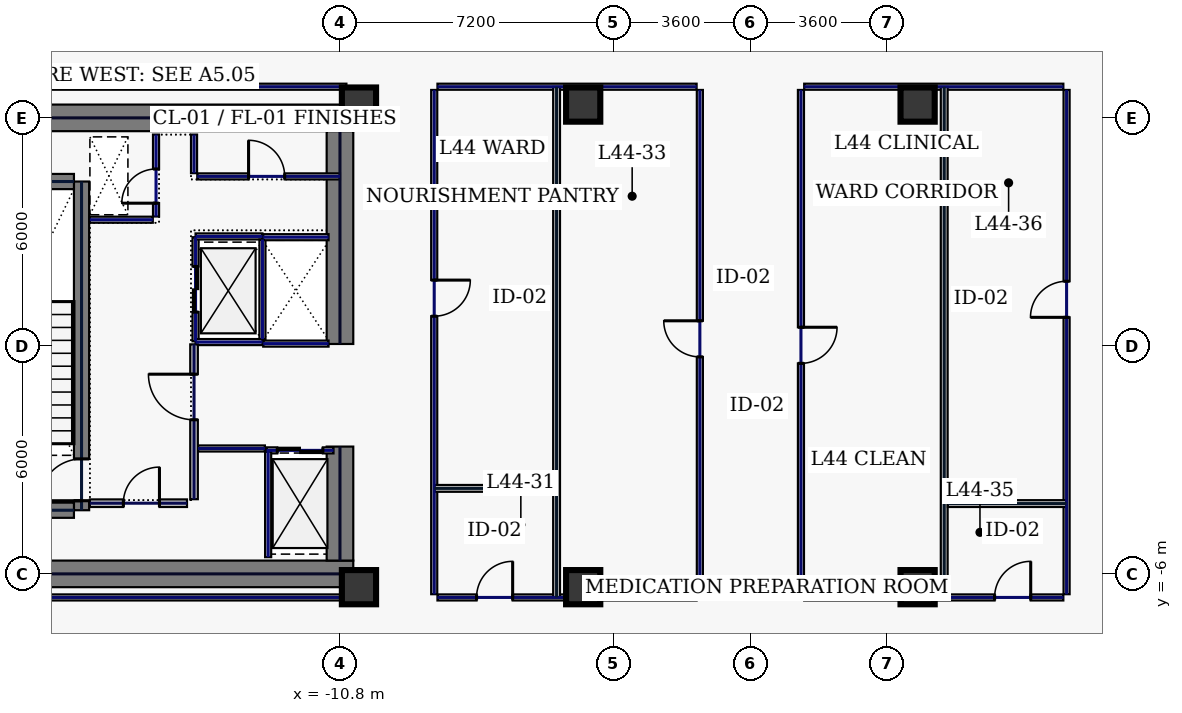
"""IFC4 building model, lengths in metres.
Left out: names, types, materials, properties, quantities, classifications, styles, units other than length and angle.
Written with IfcOpenShell. Run it as: python <this file> out.ifc"""

import sys

from ifc_helpers import new_model, si_unit, direction, frame, frame_2d, origin, origin_2d, place, context, subcontext, project, spatial, rectangle, hollow_rectangle, extrude, element, fill, save


model = new_model("IFC4")
c1 = context("Model", 3, precision=1e-05, world=origin(), true_north=direction((0.0, 1.0)))
c2 = subcontext(c1, "Body", "Model", "MODEL_VIEW")
j1 = project(units=[si_unit("LENGTHUNIT", "METRE"), si_unit("PLANEANGLEUNIT", "RADIAN")], contexts=[c1])
p1 = place(None, origin())
s1 = spatial("IfcSite", under=j1, at=p1, CompositionType="ELEMENT")
p2 = place(p1, origin())
s2 = spatial("IfcBuilding", under=s1, at=p2, CompositionType="ELEMENT")
p3 = place(p2, frame((0.0, 0.0, 192.2)))
s3 = spatial("IfcBuildingStorey", under=s2, at=p3, CompositionType="ELEMENT", Elevation=192.2)
for number, where, z_axis, x_axis in (
    (1, (-22.0, 6.0, 0.0), (0.0, 0.0, 1.0), (1.0, 0.0, 0.0)),
    (2, (-22.0, -6.0, 0.0), (0.0, 0.0, 1.0), (1.0, 0.0, 0.0)),
):
    element("IfcWall", number, at=place(p3, frame(where, z_axis=z_axis, x_axis=x_axis)), inside=s3, PredefinedType="SHEAR", context=c2, shape_type="SweptSolid", body=[
        extrude(rectangle(XDim=11.55, YDim=0.7, at=frame_2d((5.775, 0.0))), origin(), (0.0, 0.0, 1.0), 3.74),
    ])
p4 = place(p3, frame((-10.8, -5.65, 0.0), z_axis=(0.0, 0.0, 1.0), x_axis=(0.0, 1.0, 0.0)))
e3 = element("IfcWall", 3, at=p4, inside=s3, PredefinedType="SHEAR", context=c2, shape_type="SweptSolid", body=[
    extrude(rectangle(XDim=3.0, YDim=0.7, at=frame_2d((1.5, 0.0))), origin(), (0.0, 0.0, 1.0), 3.74),
])
p5 = place(p3, frame((-10.8, 0.05, 0.0), z_axis=(0.0, 0.0, 1.0), x_axis=(0.0, 1.0, 0.0)))
e4 = element("IfcWall", 4, at=p5, inside=s3, PredefinedType="SHEAR", context=c2, shape_type="SweptSolid", body=[
    extrude(rectangle(XDim=5.6, YDim=0.7, at=frame_2d((2.8, 0.0))), origin(), (0.0, 0.0, 1.0), 3.74),
])
p6 = place(p3, frame((-17.6, -4.325, 0.0), z_axis=(0.0, 0.0, 1.0), x_axis=(0.0, 1.0, 0.0)))
e5 = element("IfcWall", 5, at=p6, inside=s3, PredefinedType="SHEAR", context=c2, shape_type="SweptSolid", body=[
    extrude(rectangle(XDim=8.65, YDim=0.4, at=frame_2d((4.325, 0.0))), origin(), (0.0, 0.0, 1.0), 3.74),
])
p7 = place(p6, frame((0.25, 0.0, 0.0)))
e6 = element("IfcOpeningElement", 6, at=p7, cuts=e5, PredefinedType="OPENING", context=c2, shape_type="SweptSolid", body=[
    extrude(rectangle(XDim=1.1, YDim=2.2, at=frame_2d((0.55, 1.1))), frame((0.0, 0.21, 0.0), z_axis=(0.0, -1.0, 0.0), x_axis=(1.0, 0.0, 0.0)), (0.0, 0.0, 1.0), 0.42),
])
for number, where, z_axis, x_axis in (
    (7, (-21.2, -4.325, 0.0), (0.0, 0.0, 1.0), (1.0, 0.0, 0.0)),
    (8, (-21.2, 4.325, 0.0), (0.0, 0.0, 1.0), (1.0, 0.0, 0.0)),
):
    element("IfcWall", number, at=place(p3, frame(where, z_axis=z_axis, x_axis=x_axis)), inside=s3, PredefinedType="SHEAR", context=c2, shape_type="SweptSolid", body=[
        extrude(rectangle(XDim=3.4, YDim=0.4, at=frame_2d((1.7, 0.0))), origin(), (0.0, 0.0, 1.0), 3.74),
    ])
for number, where, z_axis, x_axis in (
    (9, (-10.3, -6.35, 0.0), (0.0, 0.0, 1.0), (1.0, 0.0, 0.0)),
    (10, (-10.3, 6.35, 0.0), (0.0, 0.0, 1.0), (1.0, 0.0, 0.0)),
    (11, (-4.4, -6.35, 0.0), (0.0, 0.0, 1.0), (1.0, 0.0, 0.0)),
    (12, (4.4, -6.35, 0.0), (0.0, 0.0, 1.0), (1.0, 0.0, 0.0)),
    (13, (-4.4, 6.35, 0.0), (0.0, 0.0, 1.0), (1.0, 0.0, 0.0)),
    (14, (4.4, 6.35, 0.0), (0.0, 0.0, 1.0), (1.0, 0.0, 0.0)),
):
    element("IfcColumn", number, at=place(p3, frame(where, z_axis=z_axis, x_axis=x_axis)), inside=s3, PredefinedType="COLUMN", context=c2, shape_type="SweptSolid", body=[
        extrude(hollow_rectangle(XDim=0.9, YDim=0.9, WallThickness=0.04, at=origin_2d()), origin(), (0.0, 0.0, 1.0), 3.74),
    ])
p8 = place(p3, frame((-14.6, 0.12, 0.0), z_axis=(0.0, 0.0, 1.0), x_axis=(0.0, 1.0, 0.0)))
e15 = element("IfcWall", 15, at=p8, inside=s3, PredefinedType="PARTITIONING", context=c2, shape_type="SweptSolid", body=[
    extrude(rectangle(XDim=2.74, YDim=0.16, at=frame_2d((1.37, 0.0))), origin(), (0.0, 0.0, 1.0), 3.74),
])
p9 = place(p8, frame((0.77, 0.0, 0.0)))
e16 = element("IfcOpeningElement", 16, at=p9, cuts=e15, PredefinedType="OPENING", context=c2, shape_type="SweptSolid", body=[
    extrude(rectangle(XDim=1.2, YDim=2.2, at=frame_2d((0.6, 1.1))), frame((0.0, 0.09, 0.0), z_axis=(0.0, -1.0, 0.0), x_axis=(1.0, 0.0, 0.0)), (0.0, 0.0, 1.0), 0.18),
])
for number, where, z_axis, x_axis in (
    (17, (-14.6, 0.1, 0.0), (0.0, 0.0, 1.0), (1.0, 0.0, 0.0)),
    (18, (-14.6, 2.88, 0.0), (0.0, 0.0, 1.0), (1.0, 0.0, 0.0)),
):
    element("IfcWall", number, at=place(p3, frame(where, z_axis=z_axis, x_axis=x_axis)), inside=s3, PredefinedType="PARTITIONING", context=c2, shape_type="SweptSolid", body=[
        extrude(rectangle(XDim=1.76, YDim=0.16, at=frame_2d((0.88, 0.0))), origin(), (0.0, 0.0, 1.0), 3.74),
    ])
p10 = place(p3, frame((-12.84, 0.18, 0.0), z_axis=(0.0, 0.0, 1.0), x_axis=(0.0, 1.0, 0.0)))
e19 = element("IfcWall", 19, at=p10, inside=s3, PredefinedType="PARTITIONING", context=c2, shape_type="SweptSolid", body=[
    extrude(rectangle(XDim=2.62, YDim=0.16, at=frame_2d((1.31, 0.0))), origin(), (0.0, 0.0, 1.0), 3.74),
])
p11 = place(p3, frame((-12.73, -2.75, 0.0), z_axis=(0.0, 0.0, 1.0), x_axis=(1.0, 0.0, 0.0)))
e20 = element("IfcWall", 20, at=p11, inside=s3, PredefinedType="PARTITIONING", context=c2, shape_type="SweptSolid", body=[
    extrude(rectangle(XDim=1.76, YDim=0.16, at=frame_2d((0.88, 0.0))), origin(), (0.0, 0.0, 1.0), 3.74),
])
p12 = place(p11, frame((0.28, 0.0, 0.0)))
e21 = element("IfcOpeningElement", 21, at=p12, cuts=e20, PredefinedType="OPENING", context=c2, shape_type="SweptSolid", body=[
    extrude(rectangle(XDim=1.2, YDim=2.2, at=frame_2d((0.6, 1.1))), frame((0.0, 0.09, 0.0), z_axis=(0.0, -1.0, 0.0), x_axis=(1.0, 0.0, 0.0)), (0.0, 0.0, 1.0), 0.18),
])
for number, where, z_axis, x_axis in (
    (22, (-12.82, 0.06, 0.0), (0.0, 0.0, 1.0), (1.0, 0.0, 0.0)),
    (23, (-12.82, 2.86, 0.0), (0.0, 0.0, 1.0), (1.0, 0.0, 0.0)),
):
    element("IfcWall", number, at=place(p3, frame(where, z_axis=z_axis, x_axis=x_axis)), inside=s3, PredefinedType="PARTITIONING", context=c2, shape_type="SweptSolid", body=[
        extrude(rectangle(XDim=1.72, YDim=0.16, at=frame_2d((0.86, 0.0))), origin(), (0.0, 0.0, 1.0), 3.74),
    ])
p13 = place(p3, frame((-15.64, 3.405, 0.0), z_axis=(0.0, 0.0, 1.0), x_axis=(0.0, 1.0, 0.0)))
e24 = element("IfcWall", 24, at=p13, inside=s3, PredefinedType="PARTITIONING", context=c2, shape_type="SweptSolid", body=[
    extrude(rectangle(XDim=2.155, YDim=0.16, at=frame_2d((1.078, 0.0))), origin(), (0.0, 0.0, 1.0), 3.74),
])
p14 = place(p13, frame((0.35, 0.0, 0.0)))
e25 = element("IfcOpeningElement", 25, at=p14, cuts=e24, PredefinedType="OPENING", context=c2, shape_type="SweptSolid", body=[
    extrude(rectangle(XDim=0.9, YDim=2.2, at=frame_2d((0.45, 1.1))), frame((0.0, 0.09, 0.0), z_axis=(0.0, -1.0, 0.0), x_axis=(1.0, 0.0, 0.0)), (0.0, 0.0, 1.0), 0.18),
])
p15 = place(p3, frame((-17.38, 3.32, 0.0), z_axis=(0.0, 0.0, 1.0), x_axis=(1.0, 0.0, 0.0)))
e26 = element("IfcWall", 26, at=p15, inside=s3, PredefinedType="PARTITIONING", context=c2, shape_type="SweptSolid", body=[
    extrude(rectangle(XDim=1.655, YDim=0.16, at=frame_2d((0.827, 0.0))), origin(), (0.0, 0.0, 1.0), 3.74),
])
p16 = place(p3, frame((-17.38, -4.14, 0.0), z_axis=(0.0, 0.0, 1.0), x_axis=(1.0, 0.0, 0.0)))
e27 = element("IfcWall", 27, at=p16, inside=s3, PredefinedType="SOLIDWALL", context=c2, shape_type="SweptSolid", body=[
    extrude(rectangle(XDim=2.555, YDim=0.2, at=frame_2d((1.277, 0.0))), origin(), (0.0, 0.0, 1.0), 3.74),
])
p17 = place(p16, frame((0.88, 0.0, 0.0)))
e28 = element("IfcOpeningElement", 28, at=p17, cuts=e27, PredefinedType="OPENING", context=c2, shape_type="SweptSolid", body=[
    extrude(rectangle(XDim=0.95, YDim=2.2, at=frame_2d((0.475, 1.1))), frame((0.0, 0.11, 0.0), z_axis=(0.0, -1.0, 0.0), x_axis=(1.0, 0.0, 0.0)), (0.0, 0.0, 1.0), 0.22),
])
p18 = place(p3, frame((-14.535, -2.7, 0.0), z_axis=(0.0, 0.0, 1.0), x_axis=(1.0, 0.0, 0.0)))
e29 = element("IfcWall", 29, at=p18, inside=s3, PredefinedType="PARTITIONING", context=c2, shape_type="SweptSolid", body=[
    extrude(rectangle(XDim=1.76, YDim=0.16, at=frame_2d((0.88, 0.0))), origin(), (0.0, 0.0, 1.0), 3.74),
])
p19 = place(p3, frame((-12.69, -5.56, 0.0), z_axis=(0.0, 0.0, 1.0), x_axis=(0.0, 1.0, 0.0)))
e30 = element("IfcWall", 30, at=p19, inside=s3, PredefinedType="PARTITIONING", context=c2, shape_type="SweptSolid", body=[
    extrude(rectangle(XDim=2.775, YDim=0.16, at=frame_2d((1.388, 0.0))), origin(), (0.0, 0.0, 1.0), 3.74),
])
p20 = place(p3, frame((-14.555, 4.46, 0.0), z_axis=(0.0, 0.0, 1.0), x_axis=(1.0, 0.0, 0.0)))
e31 = element("IfcWall", 31, at=p20, inside=s3, PredefinedType="PARTITIONING", context=c2, shape_type="SweptSolid", body=[
    extrude(rectangle(XDim=3.755, YDim=0.16, at=frame_2d((1.877, 0.0))), origin(), (0.0, 0.0, 1.0), 3.74),
])
p21 = place(p20, frame((1.35, 0.0, 0.0)))
e32 = element("IfcOpeningElement", 32, at=p21, cuts=e31, PredefinedType="OPENING", context=c2, shape_type="SweptSolid", body=[
    extrude(rectangle(XDim=0.95, YDim=2.2, at=frame_2d((0.475, 1.1))), frame((0.0, 0.09, 0.0), z_axis=(0.0, -1.0, 0.0), x_axis=(1.0, 0.0, 0.0)), (0.0, 0.0, 1.0), 0.18),
])
p22 = place(p3, frame((-14.64, 4.545, 0.0), z_axis=(0.0, 0.0, 1.0), x_axis=(0.0, 1.0, 0.0)))
e33 = element("IfcWall", 33, at=p22, inside=s3, PredefinedType="PARTITIONING", context=c2, shape_type="SweptSolid", body=[
    extrude(rectangle(XDim=1.015, YDim=0.16, at=frame_2d((0.508, 0.0))), origin(), (0.0, 0.0, 1.0), 3.74),
])
p23 = place(p3, frame((-14.64, -4.035, 0.0), z_axis=(0.0, 0.0, 1.0), x_axis=(0.0, 1.0, 0.0)))
e34 = element("IfcWall", 34, at=p23, inside=s3, PredefinedType="SOLIDWALL", context=c2, shape_type="SweptSolid", body=[
    extrude(rectangle(XDim=4.075, YDim=0.2, at=frame_2d((2.038, 0.0))), origin(), (0.0, 0.0, 1.0), 3.74),
])
p24 = place(p23, frame((2.09, 0.0, 0.0)))
e35 = element("IfcOpeningElement", 35, at=p24, cuts=e34, PredefinedType="OPENING", context=c2, shape_type="SweptSolid", body=[
    extrude(rectangle(XDim=1.2, YDim=2.2, at=frame_2d((0.6, 1.1))), frame((0.0, 0.11, 0.0), z_axis=(0.0, -1.0, 0.0), x_axis=(1.0, 0.0, 0.0)), (0.0, 0.0, 1.0), 0.22),
])
for number, where, z_axis, x_axis in (
    (36, (-24.965, -6.62, 0.0), (0.0, 0.0, 1.0), (1.0, 0.0, 0.0)),
    (37, (-10.63, 6.82, 0.0), (0.0, 0.0, 1.0), (-1.0, 0.0, 0.0)),
):
    element("IfcWall", number, at=place(p3, frame(where, z_axis=z_axis, x_axis=x_axis)), inside=s3, PredefinedType="PARTITIONING", context=c2, shape_type="SweptSolid", body=[
        extrude(rectangle(XDim=14.335, YDim=0.16, at=frame_2d((7.167, 0.0))), origin(), (0.0, 0.0, 1.0), 3.74),
    ])
p25 = place(p3, frame((8.235, 6.82, 0.0), z_axis=(0.0, 0.0, 1.0), x_axis=(-1.0, 0.0, 0.0)))
e38 = element("IfcWall", 38, at=p25, inside=s3, PredefinedType="PARTITIONING", context=c2, shape_type="SweptSolid", body=[
    extrude(rectangle(XDim=6.82, YDim=0.16, at=frame_2d((3.41, 0.0))), origin(), (0.0, 0.0, 1.0), 3.74),
])
p26 = place(p3, frame((1.33, 6.735, 0.0), z_axis=(0.0, 0.0, 1.0), x_axis=(0.0, -1.0, 0.0)))
e39 = element("IfcWall", 39, at=p26, inside=s3, PredefinedType="PARTITIONING", context=c2, shape_type="SweptSolid", body=[
    extrude(rectangle(XDim=13.27, YDim=0.16, at=frame_2d((6.635, 0.0))), origin(), (0.0, 0.0, 1.0), 3.74),
])
p27 = place(p26, frame((6.245, 0.0, 0.0)))
e40 = element("IfcOpeningElement", 40, at=p27, cuts=e39, PredefinedType="OPENING", context=c2, shape_type="SweptSolid", body=[
    extrude(rectangle(XDim=0.95, YDim=2.2, at=frame_2d((0.475, 1.1))), frame((0.0, 0.09, 0.0), z_axis=(0.0, -1.0, 0.0), x_axis=(1.0, 0.0, 0.0)), (0.0, 0.0, 1.0), 0.18),
])
p28 = place(p3, frame((1.415, -6.62, 0.0), z_axis=(0.0, 0.0, 1.0), x_axis=(1.0, 0.0, 0.0)))
e41 = element("IfcWall", 41, at=p28, inside=s3, PredefinedType="PARTITIONING", context=c2, shape_type="SweptSolid", body=[
    extrude(rectangle(XDim=6.82, YDim=0.16, at=frame_2d((3.41, 0.0))), origin(), (0.0, 0.0, 1.0), 3.74),
])
p29 = place(p28, frame((5.011, 0.0, 0.0)))
e42 = element("IfcOpeningElement", 42, at=p29, cuts=e41, PredefinedType="OPENING", context=c2, shape_type="SweptSolid", body=[
    extrude(rectangle(XDim=0.95, YDim=2.2, at=frame_2d((0.475, 1.1))), frame((0.0, 0.09, 0.0), z_axis=(0.0, -1.0, 0.0), x_axis=(1.0, 0.0, 0.0)), (0.0, 0.0, 1.0), 0.18),
])
p30 = place(p3, frame((8.32, -6.535, 0.0), z_axis=(0.0, 0.0, 1.0), x_axis=(0.0, 1.0, 0.0)))
e43 = element("IfcWall", 43, at=p30, inside=s3, PredefinedType="PARTITIONING", context=c2, shape_type="SweptSolid", body=[
    extrude(rectangle(XDim=13.27, YDim=0.16, at=frame_2d((6.635, 0.0))), origin(), (0.0, 0.0, 1.0), 3.74),
])
p31 = place(p30, frame((7.286, 0.0, 0.0)))
e44 = element("IfcOpeningElement", 44, at=p31, cuts=e43, PredefinedType="OPENING", context=c2, shape_type="SweptSolid", body=[
    extrude(rectangle(XDim=0.95, YDim=2.2, at=frame_2d((0.475, 1.1))), frame((0.0, 0.09, 0.0), z_axis=(0.0, -1.0, 0.0), x_axis=(1.0, 0.0, 0.0)), (0.0, 0.0, 1.0), 0.18),
])
p32 = place(p3, frame((-1.33, -6.535, 0.0), z_axis=(0.0, 0.0, 1.0), x_axis=(0.0, 1.0, 0.0)))
e45 = element("IfcWall", 45, at=p32, inside=s3, PredefinedType="PARTITIONING", context=c2, shape_type="SweptSolid", body=[
    extrude(rectangle(XDim=13.27, YDim=0.16, at=frame_2d((6.635, 0.0))), origin(), (0.0, 0.0, 1.0), 3.74),
])
p33 = place(p32, frame((6.245, 0.0, 0.0)))
e46 = element("IfcOpeningElement", 46, at=p33, cuts=e45, PredefinedType="OPENING", context=c2, shape_type="SweptSolid", body=[
    extrude(rectangle(XDim=0.95, YDim=2.2, at=frame_2d((0.475, 1.1))), frame((0.0, 0.09, 0.0), z_axis=(0.0, -1.0, 0.0), x_axis=(1.0, 0.0, 0.0)), (0.0, 0.0, 1.0), 0.18),
])
p34 = place(p3, frame((-1.415, 6.82, 0.0), z_axis=(0.0, 0.0, 1.0), x_axis=(-1.0, 0.0, 0.0)))
e47 = element("IfcWall", 47, at=p34, inside=s3, PredefinedType="PARTITIONING", context=c2, shape_type="SweptSolid", body=[
    extrude(rectangle(XDim=6.82, YDim=0.16, at=frame_2d((3.41, 0.0))), origin(), (0.0, 0.0, 1.0), 3.74),
])
p35 = place(p3, frame((-8.32, 6.735, 0.0), z_axis=(0.0, 0.0, 1.0), x_axis=(0.0, -1.0, 0.0)))
e48 = element("IfcWall", 48, at=p35, inside=s3, PredefinedType="PARTITIONING", context=c2, shape_type="SweptSolid", body=[
    extrude(rectangle(XDim=13.27, YDim=0.16, at=frame_2d((6.635, 0.0))), origin(), (0.0, 0.0, 1.0), 3.74),
])
p36 = place(p35, frame((5.004, 0.0, 0.0)))
e49 = element("IfcOpeningElement", 49, at=p36, cuts=e48, PredefinedType="OPENING", context=c2, shape_type="SweptSolid", body=[
    extrude(rectangle(XDim=0.95, YDim=2.2, at=frame_2d((0.475, 1.1))), frame((0.0, 0.09, 0.0), z_axis=(0.0, -1.0, 0.0), x_axis=(1.0, 0.0, 0.0)), (0.0, 0.0, 1.0), 0.18),
])
p37 = place(p3, frame((-8.235, -6.62, 0.0), z_axis=(0.0, 0.0, 1.0), x_axis=(1.0, 0.0, 0.0)))
e50 = element("IfcWall", 50, at=p37, inside=s3, PredefinedType="PARTITIONING", context=c2, shape_type="SweptSolid", body=[
    extrude(rectangle(XDim=6.82, YDim=0.16, at=frame_2d((3.41, 0.0))), origin(), (0.0, 0.0, 1.0), 3.74),
])
p38 = place(p37, frame((1.029, 0.0, 0.0)))
e51 = element("IfcOpeningElement", 51, at=p38, cuts=e50, PredefinedType="OPENING", context=c2, shape_type="SweptSolid", body=[
    extrude(rectangle(XDim=0.95, YDim=2.2, at=frame_2d((0.475, 1.1))), frame((0.0, 0.09, 0.0), z_axis=(0.0, -1.0, 0.0), x_axis=(1.0, 0.0, 0.0)), (0.0, 0.0, 1.0), 0.18),
])
for number, where, z_axis, x_axis in (
    (52, (-5.1, -6.615, 0.0), (0.0, 0.0, 1.0), (0.0, 1.0, 0.0)),
    (53, (5.1, -6.615, 0.0), (0.0, 0.0, 1.0), (0.0, 1.0, 0.0)),
):
    element("IfcWall", number, at=place(p3, frame(where, z_axis=z_axis, x_axis=x_axis)), inside=s3, PredefinedType="PARTITIONING", context=c2, shape_type="SweptSolid", body=[
        extrude(rectangle(XDim=13.43, YDim=0.18, at=frame_2d((6.715, 0.0))), origin(), (0.0, 0.0, 1.0), 3.74),
    ])
for number, where, z_axis, x_axis in (
    (54, (-8.315, -3.75, 0.0), (0.0, 0.0, 1.0), (1.0, 0.0, 0.0)),
    (55, (5.195, -4.15, 0.0), (0.0, 0.0, 1.0), (1.0, 0.0, 0.0)),
):
    element("IfcWall", number, at=place(p3, frame(where, z_axis=z_axis, x_axis=x_axis)), inside=s3, PredefinedType="PARTITIONING", context=c2, shape_type="SweptSolid", body=[
        extrude(rectangle(XDim=3.12, YDim=0.18, at=frame_2d((1.56, 0.0))), origin(), (0.0, 0.0, 1.0), 3.74),
    ])
p39 = place(p7, origin())
e56 = element("IfcDoor", 56, at=p39, inside=s3, OperationType="SINGLE_SWING_LEFT", PredefinedType="DOOR", context=c2, shape_type="SweptSolid", body=[
    extrude(rectangle(XDim=1.1, YDim=2.2, at=frame_2d((0.55, 1.1))), frame((0.0, 0.025, 0.0), z_axis=(0.0, -1.0, 0.0), x_axis=(1.0, 0.0, 0.0)), (0.0, 0.0, 1.0), 0.05),
])
fill(e6, e56)
p40 = place(p9, origin())
e57 = element("IfcDoor", 57, at=p40, inside=s3, OperationType="SLIDING_TO_LEFT", PredefinedType="DOOR", context=c2, shape_type="SweptSolid", body=[
    extrude(rectangle(XDim=1.2, YDim=2.2, at=frame_2d((0.6, 1.1))), frame((0.0, 0.025, 0.0), z_axis=(0.0, -1.0, 0.0), x_axis=(1.0, 0.0, 0.0)), (0.0, 0.0, 1.0), 0.05),
])
fill(e16, e57)
p41 = place(p12, origin())
e58 = element("IfcDoor", 58, at=p41, inside=s3, OperationType="SLIDING_TO_LEFT", PredefinedType="DOOR", context=c2, shape_type="SweptSolid", body=[
    extrude(rectangle(XDim=1.2, YDim=2.2, at=frame_2d((0.6, 1.1))), frame((0.0, 0.025, 0.0), z_axis=(0.0, -1.0, 0.0), x_axis=(1.0, 0.0, 0.0)), (0.0, 0.0, 1.0), 0.05),
])
fill(e21, e58)
p42 = place(p14, origin())
e59 = element("IfcDoor", 59, at=p42, inside=s3, OperationType="SINGLE_SWING_LEFT", PredefinedType="DOOR", context=c2, shape_type="SweptSolid", body=[
    extrude(rectangle(XDim=0.9, YDim=2.2, at=frame_2d((0.45, 1.1))), frame((0.0, 0.025, 0.0), z_axis=(0.0, -1.0, 0.0), x_axis=(1.0, 0.0, 0.0)), (0.0, 0.0, 1.0), 0.05),
])
fill(e25, e59)
p43 = place(p17, origin())
e60 = element("IfcDoor", 60, at=p43, inside=s3, OperationType="SINGLE_SWING_RIGHT", PredefinedType="DOOR", context=c2, shape_type="SweptSolid", body=[
    extrude(rectangle(XDim=0.95, YDim=2.2, at=frame_2d((0.475, 1.1))), frame((0.0, 0.025, 0.0), z_axis=(0.0, -1.0, 0.0), x_axis=(1.0, 0.0, 0.0)), (0.0, 0.0, 1.0), 0.05),
])
fill(e28, e60)
p44 = place(p21, origin())
e61 = element("IfcDoor", 61, at=p44, inside=s3, OperationType="SINGLE_SWING_LEFT", PredefinedType="DOOR", context=c2, shape_type="SweptSolid", body=[
    extrude(rectangle(XDim=0.95, YDim=2.2, at=frame_2d((0.475, 1.1))), frame((0.0, 0.025, 0.0), z_axis=(0.0, -1.0, 0.0), x_axis=(1.0, 0.0, 0.0)), (0.0, 0.0, 1.0), 0.05),
])
fill(e32, e61)
p45 = place(p24, origin())
e62 = element("IfcDoor", 62, at=p45, inside=s3, OperationType="SINGLE_SWING_RIGHT", PredefinedType="DOOR", context=c2, shape_type="SweptSolid", body=[
    extrude(rectangle(XDim=1.2, YDim=2.2, at=frame_2d((0.6, 1.1))), frame((0.0, 0.025, 0.0), z_axis=(0.0, -1.0, 0.0), x_axis=(1.0, 0.0, 0.0)), (0.0, 0.0, 1.0), 0.05),
])
fill(e35, e62)
p46 = place(p38, origin())
e63 = element("IfcDoor", 63, at=p46, inside=s3, OperationType="SINGLE_SWING_RIGHT", PredefinedType="DOOR", context=c2, shape_type="SweptSolid", body=[
    extrude(rectangle(XDim=0.95, YDim=2.2, at=frame_2d((0.475, 1.1))), frame((0.0, 0.025, 0.0), z_axis=(0.0, -1.0, 0.0), x_axis=(1.0, 0.0, 0.0)), (0.0, 0.0, 1.0), 0.05),
])
fill(e51, e63)
p47 = place(p36, origin())
e64 = element("IfcDoor", 64, at=p47, inside=s3, OperationType="SINGLE_SWING_LEFT", PredefinedType="DOOR", context=c2, shape_type="SweptSolid", body=[
    extrude(rectangle(XDim=0.95, YDim=2.2, at=frame_2d((0.475, 1.1))), frame((0.0, 0.025, 0.0), z_axis=(0.0, -1.0, 0.0), x_axis=(1.0, 0.0, 0.0)), (0.0, 0.0, 1.0), 0.05),
])
fill(e49, e64)
p48 = place(p33, origin())
e65 = element("IfcDoor", 65, at=p48, inside=s3, OperationType="SINGLE_SWING_RIGHT", PredefinedType="DOOR", context=c2, shape_type="SweptSolid", body=[
    extrude(rectangle(XDim=0.95, YDim=2.2, at=frame_2d((0.475, 1.1))), frame((0.0, 0.025, 0.0), z_axis=(0.0, -1.0, 0.0), x_axis=(1.0, 0.0, 0.0)), (0.0, 0.0, 1.0), 0.05),
])
fill(e46, e65)
p49 = place(p27, origin())
e66 = element("IfcDoor", 66, at=p49, inside=s3, OperationType="SINGLE_SWING_LEFT", PredefinedType="DOOR", context=c2, shape_type="SweptSolid", body=[
    extrude(rectangle(XDim=0.95, YDim=2.2, at=frame_2d((0.475, 1.1))), frame((0.0, 0.025, 0.0), z_axis=(0.0, -1.0, 0.0), x_axis=(1.0, 0.0, 0.0)), (0.0, 0.0, 1.0), 0.05),
])
fill(e40, e66)
p50 = place(p29, origin())
e67 = element("IfcDoor", 67, at=p50, inside=s3, OperationType="SINGLE_SWING_RIGHT", PredefinedType="DOOR", context=c2, shape_type="SweptSolid", body=[
    extrude(rectangle(XDim=0.95, YDim=2.2, at=frame_2d((0.475, 1.1))), frame((0.0, 0.025, 0.0), z_axis=(0.0, -1.0, 0.0), x_axis=(1.0, 0.0, 0.0)), (0.0, 0.0, 1.0), 0.05),
])
fill(e42, e67)
p51 = place(p31, origin())
e68 = element("IfcDoor", 68, at=p51, inside=s3, OperationType="SINGLE_SWING_LEFT", PredefinedType="DOOR", context=c2, shape_type="SweptSolid", body=[
    extrude(rectangle(XDim=0.95, YDim=2.2, at=frame_2d((0.475, 1.1))), frame((0.0, 0.025, 0.0), z_axis=(0.0, -1.0, 0.0), x_axis=(1.0, 0.0, 0.0)), (0.0, 0.0, 1.0), 0.05),
])
fill(e44, e68)
save(model, sys.argv[1])
